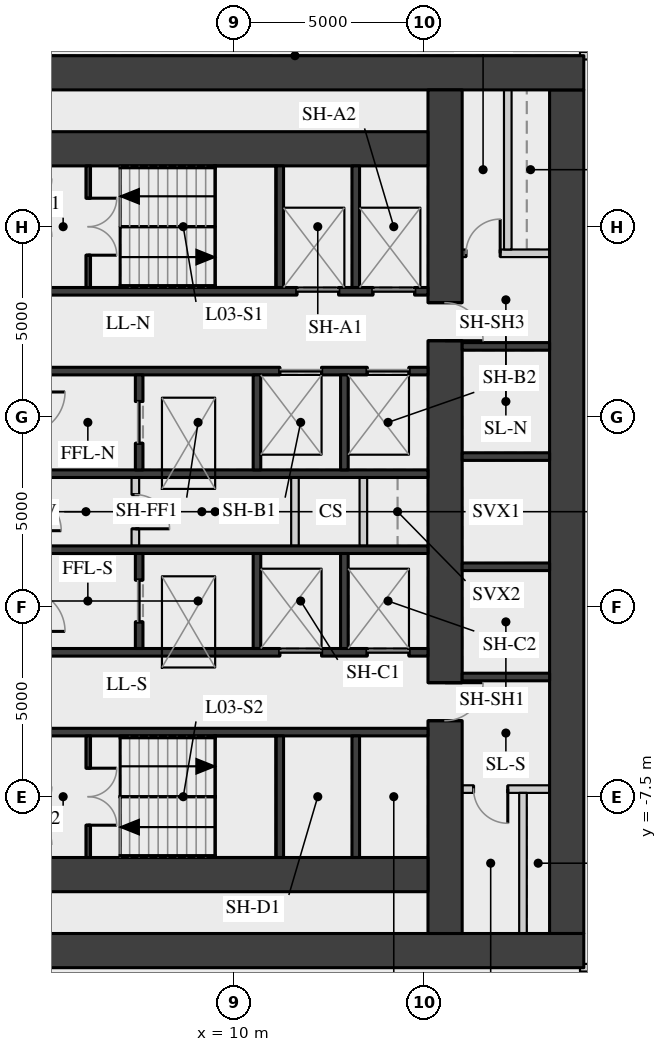
"""IFC4 building model, lengths in metres.
Left out: names, types, materials, properties, quantities, classifications, styles, units other than length and angle.
Written with IfcOpenShell. Run it as: python <this file> out.ifc"""

import sys

from ifc_helpers import new_model, si_unit, direction, frame, frame_2d, origin, place, context, subcontext, project, spatial, rectangle, extrude, element, fill, save


model = new_model("IFC4")
c1 = context("Model", 3, precision=1e-05, world=origin(), true_north=direction((0.0, 1.0)))
c2 = subcontext(c1, "Body", "Model", "MODEL_VIEW")
j1 = project(units=[si_unit("LENGTHUNIT", "METRE"), si_unit("PLANEANGLEUNIT", "RADIAN")], contexts=[c1])
p1 = place(None, origin())
s1 = spatial("IfcSite", under=j1, at=p1, CompositionType="ELEMENT")
p2 = place(p1, origin())
s2 = spatial("IfcBuilding", under=s1, at=p2, CompositionType="ELEMENT")
p3 = place(p2, frame((0.0, 0.0, 17.5)))
s3 = spatial("IfcBuildingStorey", under=s2, at=p3, CompositionType="ELEMENT", Elevation=17.5)
p4 = place(p3, frame((18.75, -11.1, 0.0), z_axis=(0.0, 0.0, 1.0), x_axis=(0.0, 1.0, 0.0)))
e1 = element("IfcWall", 1, at=p4, inside=s3, PredefinedType="SHEAR", context=c2, shape_type="SweptSolid", body=[
    extrude(rectangle(XDim=22.2, YDim=0.9, at=frame_2d((11.1, 0.0))), origin(), (0.0, 0.0, 1.0), 3.92),
])
for number, where, z_axis, x_axis in (
    (2, (4.0, 11.55, 0.0), (0.0, 0.0, 1.0), (1.0, 0.0, 0.0)),
    (3, (4.0, -11.55, 0.0), (0.0, 0.0, 1.0), (1.0, 0.0, 0.0)),
):
    element("IfcWall", number, at=place(p3, frame(where, z_axis=z_axis, x_axis=x_axis)), inside=s3, PredefinedType="SHEAR", context=c2, shape_type="SweptSolid", body=[
        extrude(rectangle(XDim=15.2, YDim=0.9, at=frame_2d((7.6, 0.0))), origin(), (0.0, 0.0, 1.0), 3.92),
    ])
p5 = place(p3, frame((15.55, -11.1, 0.0), z_axis=(0.0, 0.0, 1.0), x_axis=(0.0, 1.0, 0.0)))
e4 = element("IfcWall", 4, at=p5, inside=s3, PredefinedType="SHEAR", context=c2, shape_type="SweptSolid", body=[
    extrude(rectangle(XDim=22.2, YDim=0.9, at=frame_2d((11.1, 0.0))), origin(), (0.0, 0.0, 1.0), 3.92),
])
p6 = place(p5, frame((15.6, 0.0, 0.0)))
e5 = element("IfcOpeningElement", 5, at=p6, cuts=e4, PredefinedType="OPENING", context=c2, shape_type="SweptSolid", body=[
    extrude(rectangle(XDim=1.0, YDim=2.1, at=frame_2d((0.5, 1.05))), frame((0.0, 0.46, 0.0), z_axis=(0.0, -1.0, 0.0), x_axis=(1.0, 0.0, 0.0)), (0.0, 0.0, 1.0), 0.92),
])
p7 = place(p5, frame((5.6, 0.0, 0.0)))
e6 = element("IfcOpeningElement", 6, at=p7, cuts=e4, PredefinedType="OPENING", context=c2, shape_type="SweptSolid", body=[
    extrude(rectangle(XDim=1.0, YDim=2.1, at=frame_2d((0.5, 1.05))), frame((0.0, 0.46, 0.0), z_axis=(0.0, -1.0, 0.0), x_axis=(1.0, 0.0, 0.0)), (0.0, 0.0, 1.0), 0.92),
])
for number, where, z_axis, x_axis in (
    (7, (4.9, 9.55, 0.0), (0.0, 0.0, 1.0), (1.0, 0.0, 0.0)),
    (8, (4.9, -9.55, 0.0), (0.0, 0.0, 1.0), (1.0, 0.0, 0.0)),
):
    element("IfcWall", number, at=place(p3, frame(where, z_axis=z_axis, x_axis=x_axis)), inside=s3, PredefinedType="SHEAR", context=c2, shape_type="SweptSolid", body=[
        extrude(rectangle(XDim=10.2, YDim=0.9, at=frame_2d((5.1, 0.0))), origin(), (0.0, 0.0, 1.0), 3.92),
    ])
p8 = place(p3, frame((4.9, 5.8, 0.0), z_axis=(0.0, 0.0, 1.0), x_axis=(1.0, 0.0, 0.0)))
e9 = element("IfcWall", 9, at=p8, inside=s3, PredefinedType="SHEAR", context=c2, shape_type="SweptSolid", body=[
    extrude(rectangle(XDim=10.2, YDim=0.2, at=frame_2d((5.1, 0.0))), origin(), (0.0, 0.0, 1.0), 3.92),
])
p9 = place(p8, frame((6.75, 0.0, 0.0)))
e10 = element("IfcOpeningElement", 10, at=p9, cuts=e9, PredefinedType="OPENING", context=c2, shape_type="SweptSolid", body=[
    extrude(rectangle(XDim=1.1, YDim=2.1, at=frame_2d((0.55, 1.05))), frame((0.0, 0.11, 0.0), z_axis=(0.0, -1.0, 0.0), x_axis=(1.0, 0.0, 0.0)), (0.0, 0.0, 1.0), 0.22),
])
p10 = place(p8, frame((8.75, 0.0, 0.0)))
e11 = element("IfcOpeningElement", 11, at=p10, cuts=e9, PredefinedType="OPENING", context=c2, shape_type="SweptSolid", body=[
    extrude(rectangle(XDim=1.1, YDim=2.1, at=frame_2d((0.55, 1.05))), frame((0.0, 0.11, 0.0), z_axis=(0.0, -1.0, 0.0), x_axis=(1.0, 0.0, 0.0)), (0.0, 0.0, 1.0), 0.22),
])
p11 = place(p3, frame((4.9, 3.7, 0.0), z_axis=(0.0, 0.0, 1.0), x_axis=(1.0, 0.0, 0.0)))
e12 = element("IfcWall", 12, at=p11, inside=s3, PredefinedType="SHEAR", context=c2, shape_type="SweptSolid", body=[
    extrude(rectangle(XDim=10.2, YDim=0.2, at=frame_2d((5.1, 0.0))), origin(), (0.0, 0.0, 1.0), 3.92),
])
p12 = place(p11, frame((6.3, 0.0, 0.0)))
e13 = element("IfcOpeningElement", 13, at=p12, cuts=e12, PredefinedType="OPENING", context=c2, shape_type="SweptSolid", body=[
    extrude(rectangle(XDim=1.1, YDim=2.1, at=frame_2d((0.55, 1.05))), frame((0.0, 0.11, 0.0), z_axis=(0.0, -1.0, 0.0), x_axis=(1.0, 0.0, 0.0)), (0.0, 0.0, 1.0), 0.22),
])
p13 = place(p11, frame((8.6, 0.0, 0.0)))
e14 = element("IfcOpeningElement", 14, at=p13, cuts=e12, PredefinedType="OPENING", context=c2, shape_type="SweptSolid", body=[
    extrude(rectangle(XDim=1.1, YDim=2.1, at=frame_2d((0.55, 1.05))), frame((0.0, 0.11, 0.0), z_axis=(0.0, -1.0, 0.0), x_axis=(1.0, 0.0, 0.0)), (0.0, 0.0, 1.0), 0.22),
])
for number, where, z_axis, x_axis in (
    (15, (4.9, 1.0, 0.0), (0.0, 0.0, 1.0), (1.0, 0.0, 0.0)),
    (16, (4.9, -1.0, 0.0), (0.0, 0.0, 1.0), (1.0, 0.0, 0.0)),
):
    element("IfcWall", number, at=place(p3, frame(where, z_axis=z_axis, x_axis=x_axis)), inside=s3, PredefinedType="SHEAR", context=c2, shape_type="SweptSolid", body=[
        extrude(rectangle(XDim=10.2, YDim=0.2, at=frame_2d((5.1, 0.0))), origin(), (0.0, 0.0, 1.0), 3.92),
    ])
p14 = place(p3, frame((4.9, -3.7, 0.0), z_axis=(0.0, 0.0, 1.0), x_axis=(1.0, 0.0, 0.0)))
e17 = element("IfcWall", 17, at=p14, inside=s3, PredefinedType="SHEAR", context=c2, shape_type="SweptSolid", body=[
    extrude(rectangle(XDim=10.2, YDim=0.2, at=frame_2d((5.1, 0.0))), origin(), (0.0, 0.0, 1.0), 3.92),
])
p15 = place(p14, frame((6.3, 0.0, 0.0)))
e18 = element("IfcOpeningElement", 18, at=p15, cuts=e17, PredefinedType="OPENING", context=c2, shape_type="SweptSolid", body=[
    extrude(rectangle(XDim=1.1, YDim=2.1, at=frame_2d((0.55, 1.05))), frame((0.0, 0.11, 0.0), z_axis=(0.0, -1.0, 0.0), x_axis=(1.0, 0.0, 0.0)), (0.0, 0.0, 1.0), 0.22),
])
p16 = place(p14, frame((8.6, 0.0, 0.0)))
e19 = element("IfcOpeningElement", 19, at=p16, cuts=e17, PredefinedType="OPENING", context=c2, shape_type="SweptSolid", body=[
    extrude(rectangle(XDim=1.1, YDim=2.1, at=frame_2d((0.55, 1.05))), frame((0.0, 0.11, 0.0), z_axis=(0.0, -1.0, 0.0), x_axis=(1.0, 0.0, 0.0)), (0.0, 0.0, 1.0), 0.22),
])
p17 = place(p3, frame((4.9, -5.8, 0.0), z_axis=(0.0, 0.0, 1.0), x_axis=(1.0, 0.0, 0.0)))
e20 = element("IfcWall", 20, at=p17, inside=s3, PredefinedType="SHEAR", context=c2, shape_type="SweptSolid", body=[
    extrude(rectangle(XDim=10.2, YDim=0.2, at=frame_2d((5.1, 0.0))), origin(), (0.0, 0.0, 1.0), 3.92),
])
for number, where, z_axis, x_axis in (
    (21, (11.2, 5.9, 0.0), (0.0, 0.0, 1.0), (0.0, 1.0, 0.0)),
    (22, (11.2, -9.1, 0.0), (0.0, 0.0, 1.0), (0.0, 1.0, 0.0)),
    (23, (13.2, 5.9, 0.0), (0.0, 0.0, 1.0), (0.0, 1.0, 0.0)),
    (24, (13.2, -9.1, 0.0), (0.0, 0.0, 1.0), (0.0, 1.0, 0.0)),
):
    element("IfcWall", number, at=place(p3, frame(where, z_axis=z_axis, x_axis=x_axis)), inside=s3, PredefinedType="SHEAR", context=c2, shape_type="SweptSolid", body=[
        extrude(rectangle(XDim=3.2, YDim=0.2, at=frame_2d((1.6, 0.0))), origin(), (0.0, 0.0, 1.0), 3.92),
    ])
p18 = place(p3, frame((7.5, 1.1, 0.0), z_axis=(0.0, 0.0, 1.0), x_axis=(0.0, 1.0, 0.0)))
e25 = element("IfcWall", 25, at=p18, inside=s3, PredefinedType="SHEAR", context=c2, shape_type="SweptSolid", body=[
    extrude(rectangle(XDim=2.5, YDim=0.2, at=frame_2d((1.25, 0.0))), origin(), (0.0, 0.0, 1.0), 3.92),
])
p19 = place(p18, frame((0.7, 0.0, 0.0)))
e26 = element("IfcOpeningElement", 26, at=p19, cuts=e25, PredefinedType="OPENING", context=c2, shape_type="SweptSolid", body=[
    extrude(rectangle(XDim=1.1, YDim=2.1, at=frame_2d((0.55, 1.05))), frame((0.0, 0.11, 0.0), z_axis=(0.0, -1.0, 0.0), x_axis=(1.0, 0.0, 0.0)), (0.0, 0.0, 1.0), 0.22),
])
p20 = place(p3, frame((7.5, -3.6, 0.0), z_axis=(0.0, 0.0, 1.0), x_axis=(0.0, 1.0, 0.0)))
e27 = element("IfcWall", 27, at=p20, inside=s3, PredefinedType="SHEAR", context=c2, shape_type="SweptSolid", body=[
    extrude(rectangle(XDim=2.5, YDim=0.2, at=frame_2d((1.25, 0.0))), origin(), (0.0, 0.0, 1.0), 3.92),
])
p21 = place(p20, frame((0.7, 0.0, 0.0)))
e28 = element("IfcOpeningElement", 28, at=p21, cuts=e27, PredefinedType="OPENING", context=c2, shape_type="SweptSolid", body=[
    extrude(rectangle(XDim=1.1, YDim=2.1, at=frame_2d((0.55, 1.05))), frame((0.0, 0.11, 0.0), z_axis=(0.0, -1.0, 0.0), x_axis=(1.0, 0.0, 0.0)), (0.0, 0.0, 1.0), 0.22),
])
for number, where, z_axis, x_axis in (
    (29, (10.6, 1.1, 0.0), (0.0, 0.0, 1.0), (0.0, 1.0, 0.0)),
    (30, (10.6, -3.6, 0.0), (0.0, 0.0, 1.0), (0.0, 1.0, 0.0)),
    (31, (12.9, 1.1, 0.0), (0.0, 0.0, 1.0), (0.0, 1.0, 0.0)),
    (32, (12.9, -3.6, 0.0), (0.0, 0.0, 1.0), (0.0, 1.0, 0.0)),
):
    element("IfcWall", number, at=place(p3, frame(where, z_axis=z_axis, x_axis=x_axis)), inside=s3, PredefinedType="SHEAR", context=c2, shape_type="SweptSolid", body=[
        extrude(rectangle(XDim=2.5, YDim=0.2, at=frame_2d((1.25, 0.0))), origin(), (0.0, 0.0, 1.0), 3.92),
    ])
p22 = place(p3, frame((6.16, 5.9, 0.0), z_axis=(0.0, 0.0, 1.0), x_axis=(0.0, 1.0, 0.0)))
e33 = element("IfcWall", 33, at=p22, inside=s3, PredefinedType="SHEAR", context=c2, shape_type="SweptSolid", body=[
    extrude(rectangle(XDim=3.2, YDim=0.12, at=frame_2d((1.6, 0.0))), origin(), (0.0, 0.0, 1.0), 3.92),
])
p23 = place(p22, frame((0.85, 0.0, 0.0)))
e34 = element("IfcOpeningElement", 34, at=p23, cuts=e33, PredefinedType="OPENING", context=c2, shape_type="SweptSolid", body=[
    extrude(rectangle(XDim=1.5, YDim=2.1, at=frame_2d((0.75, 1.05))), frame((0.0, 0.07, 0.0), z_axis=(0.0, -1.0, 0.0), x_axis=(1.0, 0.0, 0.0)), (0.0, 0.0, 1.0), 0.14),
])
p24 = place(p3, frame((6.16, -9.1, 0.0), z_axis=(0.0, 0.0, 1.0), x_axis=(0.0, 1.0, 0.0)))
e35 = element("IfcWall", 35, at=p24, inside=s3, PredefinedType="SHEAR", context=c2, shape_type="SweptSolid", body=[
    extrude(rectangle(XDim=3.2, YDim=0.12, at=frame_2d((1.6, 0.0))), origin(), (0.0, 0.0, 1.0), 3.92),
])
p25 = place(p24, frame((0.85, 0.0, 0.0)))
e36 = element("IfcOpeningElement", 36, at=p25, cuts=e35, PredefinedType="OPENING", context=c2, shape_type="SweptSolid", body=[
    extrude(rectangle(XDim=1.5, YDim=2.1, at=frame_2d((0.75, 1.05))), frame((0.0, 0.07, 0.0), z_axis=(0.0, -1.0, 0.0), x_axis=(1.0, 0.0, 0.0)), (0.0, 0.0, 1.0), 0.14),
])
p26 = place(p3, frame((7.4, -0.9, 0.0), z_axis=(0.0, 0.0, 1.0), x_axis=(0.0, 1.0, 0.0)))
e37 = element("IfcWall", 37, at=p26, inside=s3, PredefinedType="PARTITIONING", context=c2, shape_type="SweptSolid", body=[
    extrude(rectangle(XDim=1.8, YDim=0.2, at=frame_2d((0.9, 0.0))), origin(), (0.0, 0.0, 1.0), 3.92),
])
p27 = place(p26, frame((0.45, 0.0, 0.0)))
e38 = element("IfcOpeningElement", 38, at=p27, cuts=e37, PredefinedType="OPENING", context=c2, shape_type="SweptSolid", body=[
    extrude(rectangle(XDim=0.9, YDim=2.1, at=frame_2d((0.45, 1.05))), frame((0.0, 0.11, 0.0), z_axis=(0.0, -1.0, 0.0), x_axis=(1.0, 0.0, 0.0)), (0.0, 0.0, 1.0), 0.22),
])
for number, where, z_axis, x_axis in (
    (39, (11.6, -0.9, 0.0), (0.0, 0.0, 1.0), (0.0, 1.0, 0.0)),
    (40, (13.4, -0.9, 0.0), (0.0, 0.0, 1.0), (0.0, 1.0, 0.0)),
):
    element("IfcWall", number, at=place(p3, frame(where, z_axis=z_axis, x_axis=x_axis)), inside=s3, PredefinedType="PARTITIONING", context=c2, shape_type="SweptSolid", body=[
        extrude(rectangle(XDim=1.8, YDim=0.2, at=frame_2d((0.9, 0.0))), origin(), (0.0, 0.0, 1.0), 3.92),
    ])
for number, where, z_axis, x_axis in (
    (41, (16.0, -4.35, 0.0), (0.0, 0.0, 1.0), (1.0, 0.0, 0.0)),
    (42, (16.0, -1.45, 0.0), (0.0, 0.0, 1.0), (1.0, 0.0, 0.0)),
    (43, (16.0, 1.45, 0.0), (0.0, 0.0, 1.0), (1.0, 0.0, 0.0)),
    (44, (16.0, 4.35, 0.0), (0.0, 0.0, 1.0), (1.0, 0.0, 0.0)),
):
    element("IfcWall", number, at=place(p3, frame(where, z_axis=z_axis, x_axis=x_axis)), inside=s3, PredefinedType="SHEAR", context=c2, shape_type="SweptSolid", body=[
        extrude(rectangle(XDim=2.3, YDim=0.2, at=frame_2d((1.15, 0.0))), origin(), (0.0, 0.0, 1.0), 3.92),
    ])
p28 = place(p3, frame((16.0, 6.8, 0.0), z_axis=(0.0, 0.0, 1.0), x_axis=(1.0, 0.0, 0.0)))
e45 = element("IfcWall", 45, at=p28, inside=s3, PredefinedType="PARTITIONING", context=c2, shape_type="SweptSolid", body=[
    extrude(rectangle(XDim=2.3, YDim=0.2, at=frame_2d((1.15, 0.0))), origin(), (0.0, 0.0, 1.0), 3.92),
])
p29 = place(p28, frame((0.1, 0.0, 0.0)))
e46 = element("IfcOpeningElement", 46, at=p29, cuts=e45, PredefinedType="OPENING", context=c2, shape_type="SweptSolid", body=[
    extrude(rectangle(XDim=0.9, YDim=2.1, at=frame_2d((0.45, 1.05))), frame((0.0, 0.11, 0.0), z_axis=(0.0, -1.0, 0.0), x_axis=(1.0, 0.0, 0.0)), (0.0, 0.0, 1.0), 0.22),
])
p30 = place(p3, frame((17.2, 6.9, 0.0), z_axis=(0.0, 0.0, 1.0), x_axis=(0.0, 1.0, 0.0)))
e47 = element("IfcWall", 47, at=p30, inside=s3, PredefinedType="PARTITIONING", context=c2, shape_type="SweptSolid", body=[
    extrude(rectangle(XDim=4.2, YDim=0.2, at=frame_2d((2.1, 0.0))), origin(), (0.0, 0.0, 1.0), 3.92),
])
p31 = place(p3, frame((16.0, -7.3, 0.0), z_axis=(0.0, 0.0, 1.0), x_axis=(1.0, 0.0, 0.0)))
e48 = element("IfcWall", 48, at=p31, inside=s3, PredefinedType="PARTITIONING", context=c2, shape_type="SweptSolid", body=[
    extrude(rectangle(XDim=2.3, YDim=0.2, at=frame_2d((1.15, 0.0))), origin(), (0.0, 0.0, 1.0), 3.92),
])
p32 = place(p31, frame((0.3, 0.0, 0.0)))
e49 = element("IfcOpeningElement", 49, at=p32, cuts=e48, PredefinedType="OPENING", context=c2, shape_type="SweptSolid", body=[
    extrude(rectangle(XDim=0.9, YDim=2.1, at=frame_2d((0.45, 1.05))), frame((0.0, 0.11, 0.0), z_axis=(0.0, -1.0, 0.0), x_axis=(1.0, 0.0, 0.0)), (0.0, 0.0, 1.0), 0.22),
])
p33 = place(p3, frame((17.6, -11.1, 0.0), z_axis=(0.0, 0.0, 1.0), x_axis=(0.0, 1.0, 0.0)))
e50 = element("IfcWall", 50, at=p33, inside=s3, PredefinedType="PARTITIONING", context=c2, shape_type="SweptSolid", body=[
    extrude(rectangle(XDim=3.7, YDim=0.2, at=frame_2d((1.85, 0.0))), origin(), (0.0, 0.0, 1.0), 3.92),
])
p34 = place(p3, frame((19.1, -12.0, 0.0), z_axis=(0.0, 0.0, 1.0), x_axis=(1.0, 0.0, 0.0)))
e51 = element("IfcWall", 51, at=p34, inside=s3, PredefinedType="PARTITIONING", context=c2, shape_type="SweptSolid", body=[
    extrude(rectangle(XDim=6.082, YDim=0.2, at=frame_2d((3.041, 0.0))), origin(), (0.0, 0.0, 1.0), 3.92),
])
p35 = place(p34, frame((2.541, 0.0, 0.0)))
e52 = element("IfcOpeningElement", 52, at=p35, cuts=e51, PredefinedType="OPENING", context=c2, shape_type="SweptSolid", body=[
    extrude(rectangle(XDim=1.0, YDim=2.1, at=frame_2d((0.5, 1.05))), frame((0.0, 0.11, 0.0), z_axis=(0.0, -1.0, 0.0), x_axis=(1.0, 0.0, 0.0)), (0.0, 0.0, 1.0), 0.22),
])
p36 = place(p3, frame((19.1, 12.0, 0.0), z_axis=(0.0, 0.0, 1.0), x_axis=(1.0, 0.0, 0.0)))
e53 = element("IfcWall", 53, at=p36, inside=s3, PredefinedType="PARTITIONING", context=c2, shape_type="SweptSolid", body=[
    extrude(rectangle(XDim=6.082, YDim=0.2, at=frame_2d((3.041, 0.0))), origin(), (0.0, 0.0, 1.0), 3.92),
])
p37 = place(p36, frame((2.541, 0.0, 0.0)))
e54 = element("IfcOpeningElement", 54, at=p37, cuts=e53, PredefinedType="OPENING", context=c2, shape_type="SweptSolid", body=[
    extrude(rectangle(XDim=1.0, YDim=2.1, at=frame_2d((0.5, 1.05))), frame((0.0, 0.11, 0.0), z_axis=(0.0, -1.0, 0.0), x_axis=(1.0, 0.0, 0.0)), (0.0, 0.0, 1.0), 0.22),
])
p38 = place(p23, origin())
e55 = element("IfcDoor", 55, at=p38, inside=s3, OperationType="DOUBLE_DOOR_SINGLE_SWING", PredefinedType="DOOR", context=c2, shape_type="SweptSolid", body=[
    extrude(rectangle(XDim=1.5, YDim=2.1, at=frame_2d((0.75, 1.05))), frame((0.0, 0.025, 0.0), z_axis=(0.0, -1.0, 0.0), x_axis=(1.0, 0.0, 0.0)), (0.0, 0.0, 1.0), 0.05),
])
fill(e34, e55)
p39 = place(p25, origin())
e56 = element("IfcDoor", 56, at=p39, inside=s3, OperationType="DOUBLE_DOOR_SINGLE_SWING", PredefinedType="DOOR", context=c2, shape_type="SweptSolid", body=[
    extrude(rectangle(XDim=1.5, YDim=2.1, at=frame_2d((0.75, 1.05))), frame((0.0, 0.025, 0.0), z_axis=(0.0, -1.0, 0.0), x_axis=(1.0, 0.0, 0.0)), (0.0, 0.0, 1.0), 0.05),
])
fill(e36, e56)
p40 = place(p9, origin())
e57 = element("IfcDoor", 57, at=p40, inside=s3, OperationType="DOUBLE_DOOR_SLIDING", PredefinedType="DOOR", context=c2, shape_type="SweptSolid", body=[
    extrude(rectangle(XDim=1.1, YDim=2.1, at=frame_2d((0.55, 1.05))), frame((0.0, 0.025, 0.0), z_axis=(0.0, -1.0, 0.0), x_axis=(1.0, 0.0, 0.0)), (0.0, 0.0, 1.0), 0.05),
])
fill(e10, e57)
p41 = place(p10, origin())
e58 = element("IfcDoor", 58, at=p41, inside=s3, OperationType="DOUBLE_DOOR_SLIDING", PredefinedType="DOOR", context=c2, shape_type="SweptSolid", body=[
    extrude(rectangle(XDim=1.1, YDim=2.1, at=frame_2d((0.55, 1.05))), frame((0.0, 0.025, 0.0), z_axis=(0.0, -1.0, 0.0), x_axis=(1.0, 0.0, 0.0)), (0.0, 0.0, 1.0), 0.05),
])
fill(e11, e58)
p42 = place(p12, origin())
e59 = element("IfcDoor", 59, at=p42, inside=s3, OperationType="DOUBLE_DOOR_SLIDING", PredefinedType="DOOR", context=c2, shape_type="SweptSolid", body=[
    extrude(rectangle(XDim=1.1, YDim=2.1, at=frame_2d((0.55, 1.05))), frame((0.0, 0.025, 0.0), z_axis=(0.0, -1.0, 0.0), x_axis=(1.0, 0.0, 0.0)), (0.0, 0.0, 1.0), 0.05),
])
fill(e13, e59)
p43 = place(p13, origin())
e60 = element("IfcDoor", 60, at=p43, inside=s3, OperationType="DOUBLE_DOOR_SLIDING", PredefinedType="DOOR", context=c2, shape_type="SweptSolid", body=[
    extrude(rectangle(XDim=1.1, YDim=2.1, at=frame_2d((0.55, 1.05))), frame((0.0, 0.025, 0.0), z_axis=(0.0, -1.0, 0.0), x_axis=(1.0, 0.0, 0.0)), (0.0, 0.0, 1.0), 0.05),
])
fill(e14, e60)
p44 = place(p15, origin())
e61 = element("IfcDoor", 61, at=p44, inside=s3, OperationType="DOUBLE_DOOR_SLIDING", PredefinedType="DOOR", context=c2, shape_type="SweptSolid", body=[
    extrude(rectangle(XDim=1.1, YDim=2.1, at=frame_2d((0.55, 1.05))), frame((0.0, 0.025, 0.0), z_axis=(0.0, -1.0, 0.0), x_axis=(1.0, 0.0, 0.0)), (0.0, 0.0, 1.0), 0.05),
])
fill(e18, e61)
p45 = place(p16, origin())
e62 = element("IfcDoor", 62, at=p45, inside=s3, OperationType="DOUBLE_DOOR_SLIDING", PredefinedType="DOOR", context=c2, shape_type="SweptSolid", body=[
    extrude(rectangle(XDim=1.1, YDim=2.1, at=frame_2d((0.55, 1.05))), frame((0.0, 0.025, 0.0), z_axis=(0.0, -1.0, 0.0), x_axis=(1.0, 0.0, 0.0)), (0.0, 0.0, 1.0), 0.05),
])
fill(e19, e62)
p46 = place(p19, origin())
e63 = element("IfcDoor", 63, at=p46, inside=s3, OperationType="DOUBLE_DOOR_SLIDING", PredefinedType="DOOR", context=c2, shape_type="SweptSolid", body=[
    extrude(rectangle(XDim=1.1, YDim=2.1, at=frame_2d((0.55, 1.05))), frame((0.0, 0.025, 0.0), z_axis=(0.0, -1.0, 0.0), x_axis=(1.0, 0.0, 0.0)), (0.0, 0.0, 1.0), 0.05),
])
fill(e26, e63)
p47 = place(p21, origin())
e64 = element("IfcDoor", 64, at=p47, inside=s3, OperationType="DOUBLE_DOOR_SLIDING", PredefinedType="DOOR", context=c2, shape_type="SweptSolid", body=[
    extrude(rectangle(XDim=1.1, YDim=2.1, at=frame_2d((0.55, 1.05))), frame((0.0, 0.025, 0.0), z_axis=(0.0, -1.0, 0.0), x_axis=(1.0, 0.0, 0.0)), (0.0, 0.0, 1.0), 0.05),
])
fill(e28, e64)
p48 = place(p27, origin())
e65 = element("IfcDoor", 65, at=p48, inside=s3, OperationType="SINGLE_SWING_RIGHT", PredefinedType="DOOR", context=c2, shape_type="SweptSolid", body=[
    extrude(rectangle(XDim=0.9, YDim=2.1, at=frame_2d((0.45, 1.05))), frame((0.0, 0.025, 0.0), z_axis=(0.0, -1.0, 0.0), x_axis=(1.0, 0.0, 0.0)), (0.0, 0.0, 1.0), 0.05),
])
fill(e38, e65)
p49 = place(p6, origin())
e66 = element("IfcDoor", 66, at=p49, inside=s3, OperationType="SINGLE_SWING_RIGHT", PredefinedType="DOOR", context=c2, shape_type="SweptSolid", body=[
    extrude(rectangle(XDim=1.0, YDim=2.1, at=frame_2d((0.5, 1.05))), frame((0.0, 0.025, 0.0), z_axis=(0.0, -1.0, 0.0), x_axis=(1.0, 0.0, 0.0)), (0.0, 0.0, 1.0), 0.05),
])
fill(e5, e66)
p50 = place(p29, origin())
e67 = element("IfcDoor", 67, at=p50, inside=s3, OperationType="SINGLE_SWING_RIGHT", PredefinedType="DOOR", context=c2, shape_type="SweptSolid", body=[
    extrude(rectangle(XDim=0.9, YDim=2.1, at=frame_2d((0.45, 1.05))), frame((0.0, 0.025, 0.0), z_axis=(0.0, -1.0, 0.0), x_axis=(1.0, 0.0, 0.0)), (0.0, 0.0, 1.0), 0.05),
])
fill(e46, e67)
p51 = place(p7, origin())
e68 = element("IfcDoor", 68, at=p51, inside=s3, OperationType="SINGLE_SWING_LEFT", PredefinedType="DOOR", context=c2, shape_type="SweptSolid", body=[
    extrude(rectangle(XDim=1.0, YDim=2.1, at=frame_2d((0.5, 1.05))), frame((0.0, 0.025, 0.0), z_axis=(0.0, -1.0, 0.0), x_axis=(1.0, 0.0, 0.0)), (0.0, 0.0, 1.0), 0.05),
])
fill(e6, e68)
p52 = place(p32, origin())
e69 = element("IfcDoor", 69, at=p52, inside=s3, OperationType="SINGLE_SWING_LEFT", PredefinedType="DOOR", context=c2, shape_type="SweptSolid", body=[
    extrude(rectangle(XDim=0.9, YDim=2.1, at=frame_2d((0.45, 1.05))), frame((0.0, 0.025, 0.0), z_axis=(0.0, -1.0, 0.0), x_axis=(1.0, 0.0, 0.0)), (0.0, 0.0, 1.0), 0.05),
])
fill(e49, e69)
save(model, sys.argv[1])
